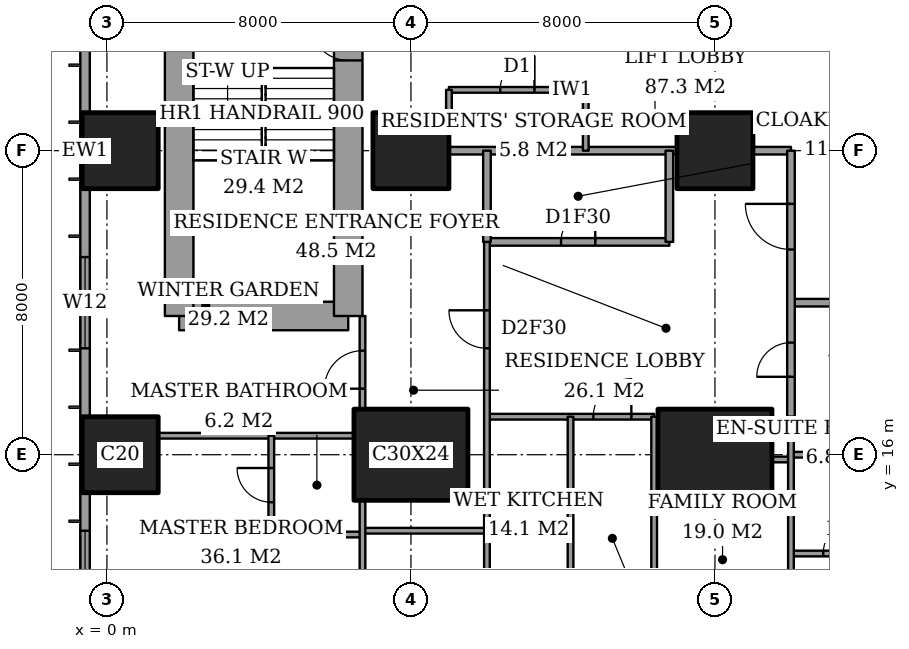
"""IFC4 building model, lengths in metres.
Left out: names, types, materials, properties, quantities, classifications, styles, units other than length and angle.
Written with IfcOpenShell. Run it as: python <this file> out.ifc"""

import sys

from ifc_helpers import new_model, si_unit, direction, frame, frame_2d, origin, origin_2d, place, context, subcontext, project, spatial, rectangle, extrude, element, fill, save


model = new_model("IFC4")
c1 = context("Model", 3, precision=1e-05, world=origin(), true_north=direction((0.0, 1.0)))
c2 = subcontext(c1, "Body", "Model", "MODEL_VIEW")
j1 = project(units=[si_unit("LENGTHUNIT", "METRE"), si_unit("PLANEANGLEUNIT", "RADIAN")], contexts=[c1])
p1 = place(None, origin())
s1 = spatial("IfcSite", under=j1, at=p1, CompositionType="ELEMENT")
p2 = place(p1, origin())
s2 = spatial("IfcBuilding", under=s1, at=p2, CompositionType="ELEMENT")
p3 = place(p2, frame((0.0, 0.0, 139.4)))
s3 = spatial("IfcBuildingStorey", under=s2, at=p3, CompositionType="ELEMENT", Elevation=139.4)
for number, where, z_axis, x_axis in (
    (1, (0.35, 16.0, 0.0), (0.0, 0.0, 1.0), (1.0, 0.0, 0.0)),
    (2, (0.35, 24.0, 0.0), (0.0, 0.0, 1.0), (1.0, 0.0, 0.0)),
):
    element("IfcColumn", number, at=place(p3, frame(where, z_axis=z_axis, x_axis=x_axis)), inside=s3, PredefinedType="COLUMN", context=c2, shape_type="SweptSolid", body=[
        extrude(rectangle(XDim=2.0, YDim=2.0, at=origin_2d()), origin(), (0.0, 0.0, 1.0), 3.6),
    ])
p4 = place(p3, frame((8.0, 16.0, 0.0), z_axis=(0.0, 0.0, 1.0), x_axis=(1.0, 0.0, 0.0)))
e3 = element("IfcColumn", 3, at=p4, inside=s3, PredefinedType="COLUMN", context=c2, shape_type="SweptSolid", body=[
    extrude(rectangle(XDim=3.0, YDim=2.4, at=origin_2d()), origin(), (0.0, 0.0, 1.0), 3.6),
])
p5 = place(p3, frame((8.0, 24.0, 0.0), z_axis=(0.0, 0.0, 1.0), x_axis=(1.0, 0.0, 0.0)))
e4 = element("IfcColumn", 4, at=p5, inside=s3, PredefinedType="COLUMN", context=c2, shape_type="SweptSolid", body=[
    extrude(rectangle(XDim=2.0, YDim=2.0, at=origin_2d()), origin(), (0.0, 0.0, 1.0), 3.6),
])
p6 = place(p3, frame((16.0, 16.0, 0.0), z_axis=(0.0, 0.0, 1.0), x_axis=(1.0, 0.0, 0.0)))
e5 = element("IfcColumn", 5, at=p6, inside=s3, PredefinedType="COLUMN", context=c2, shape_type="SweptSolid", body=[
    extrude(rectangle(XDim=3.0, YDim=2.4, at=origin_2d()), origin(), (0.0, 0.0, 1.0), 3.6),
])
p7 = place(p3, frame((16.0, 24.0, 0.0), z_axis=(0.0, 0.0, 1.0), x_axis=(1.0, 0.0, 0.0)))
e6 = element("IfcColumn", 6, at=p7, inside=s3, PredefinedType="COLUMN", context=c2, shape_type="SweptSolid", body=[
    extrude(rectangle(XDim=2.0, YDim=2.0, at=origin_2d()), origin(), (0.0, 0.0, 1.0), 3.6),
])
p8 = place(p3, frame((1.9, 19.65, 0.0), z_axis=(0.0, 0.0, 1.0), x_axis=(1.0, 0.0, 0.0)))
e7 = element("IfcWall", 7, at=p8, inside=s3, PredefinedType="SHEAR", context=c2, shape_type="SweptSolid", body=[
    extrude(rectangle(XDim=4.45, YDim=0.75, at=frame_2d((2.225, 0.0))), origin(), (0.0, 0.0, 1.0), 3.6),
])
p9 = place(p3, frame((6.35, 19.65, 0.0), z_axis=(0.0, 0.0, 1.0), x_axis=(0.0, 1.0, 0.0)))
e8 = element("IfcWall", 8, at=p9, inside=s3, PredefinedType="SHEAR", context=c2, shape_type="SweptSolid", body=[
    extrude(rectangle(XDim=8.7, YDim=0.75, at=frame_2d((4.35, 0.0))), origin(), (0.0, 0.0, 1.0), 3.6),
])
p10 = place(p9, frame((6.725, 0.0, 0.0)))
e9 = element("IfcOpeningElement", 9, at=p10, cuts=e8, PredefinedType="OPENING", context=c2, shape_type="SweptSolid", body=[
    extrude(rectangle(XDim=1.0, YDim=2.1, at=frame_2d((0.5, 1.05))), frame((0.0, 0.385, 0.0), z_axis=(0.0, -1.0, 0.0), x_axis=(1.0, 0.0, 0.0)), (0.0, 0.0, 1.0), 0.77),
])
p11 = place(p3, frame((1.9, 28.35, 0.0), z_axis=(0.0, 0.0, 1.0), x_axis=(0.0, -1.0, 0.0)))
e10 = element("IfcWall", 10, at=p11, inside=s3, PredefinedType="SHEAR", context=c2, shape_type="SweptSolid", body=[
    extrude(rectangle(XDim=8.7, YDim=0.75, at=frame_2d((4.35, 0.0))), origin(), (0.0, 0.0, 1.0), 3.6),
])
p12 = place(p3, frame((-0.575, 44.825, 0.0), z_axis=(0.0, 0.0, 1.0), x_axis=(0.0, -1.0, 0.0)))
e11 = element("IfcWall", 11, at=p12, inside=s3, PredefinedType="SOLIDWALL", context=c2, shape_type="SweptSolid", body=[
    extrude(rectangle(XDim=41.65, YDim=0.25, at=frame_2d((20.825, 0.0))), origin(), (0.0, 0.0, 1.0), 3.6),
])
p13 = place(p12, frame((0.775, 0.0, 0.4)))
e12 = element("IfcOpeningElement", 12, at=p13, cuts=e11, PredefinedType="OPENING", context=c2, shape_type="SweptSolid", body=[
    extrude(rectangle(XDim=2.4, YDim=2.2, at=frame_2d((1.2, 1.1))), frame((0.0, 0.135, 0.0), z_axis=(0.0, -1.0, 0.0), x_axis=(1.0, 0.0, 0.0)), (0.0, 0.0, 1.0), 0.27),
])
p14 = place(p12, frame((6.1, 0.0, 0.4)))
e13 = element("IfcOpeningElement", 13, at=p14, cuts=e11, PredefinedType="OPENING", context=c2, shape_type="SweptSolid", body=[
    extrude(rectangle(XDim=1.2, YDim=2.2, at=frame_2d((0.6, 1.1))), frame((0.0, 0.135, 0.0), z_axis=(0.0, -1.0, 0.0), x_axis=(1.0, 0.0, 0.0)), (0.0, 0.0, 1.0), 0.27),
])
p15 = place(p12, frame((8.425, 0.0, 0.4)))
e14 = element("IfcOpeningElement", 14, at=p15, cuts=e11, PredefinedType="OPENING", context=c2, shape_type="SweptSolid", body=[
    extrude(rectangle(XDim=2.4, YDim=2.2, at=frame_2d((1.2, 1.1))), frame((0.0, 0.135, 0.0), z_axis=(0.0, -1.0, 0.0), x_axis=(1.0, 0.0, 0.0)), (0.0, 0.0, 1.0), 0.27),
])
p16 = place(p12, frame((15.625, 0.0, 0.4)))
e15 = element("IfcOpeningElement", 15, at=p16, cuts=e11, PredefinedType="OPENING", context=c2, shape_type="SweptSolid", body=[
    extrude(rectangle(XDim=2.4, YDim=2.2, at=frame_2d((1.2, 1.1))), frame((0.0, 0.135, 0.0), z_axis=(0.0, -1.0, 0.0), x_axis=(1.0, 0.0, 0.0)), (0.0, 0.0, 1.0), 0.27),
])
p17 = place(p12, frame((23.625, 0.0, 0.4)))
e16 = element("IfcOpeningElement", 16, at=p17, cuts=e11, PredefinedType="OPENING", context=c2, shape_type="SweptSolid", body=[
    extrude(rectangle(XDim=2.4, YDim=2.2, at=frame_2d((1.2, 1.1))), frame((0.0, 0.135, 0.0), z_axis=(0.0, -1.0, 0.0), x_axis=(1.0, 0.0, 0.0)), (0.0, 0.0, 1.0), 0.27),
])
p18 = place(p12, frame((30.825, 0.0, 0.4)))
e17 = element("IfcOpeningElement", 17, at=p18, cuts=e11, PredefinedType="OPENING", context=c2, shape_type="SweptSolid", body=[
    extrude(rectangle(XDim=2.4, YDim=2.2, at=frame_2d((1.2, 1.1))), frame((0.0, 0.135, 0.0), z_axis=(0.0, -1.0, 0.0), x_axis=(1.0, 0.0, 0.0)), (0.0, 0.0, 1.0), 0.27),
])
p19 = place(p12, frame((34.5, 0.0, 0.4)))
e18 = element("IfcOpeningElement", 18, at=p19, cuts=e11, PredefinedType="OPENING", context=c2, shape_type="SweptSolid", body=[
    extrude(rectangle(XDim=1.2, YDim=2.2, at=frame_2d((0.6, 1.1))), frame((0.0, 0.135, 0.0), z_axis=(0.0, -1.0, 0.0), x_axis=(1.0, 0.0, 0.0)), (0.0, 0.0, 1.0), 0.27),
])
p20 = place(p12, frame((38.475, 0.0, 0.4)))
e19 = element("IfcOpeningElement", 19, at=p20, cuts=e11, PredefinedType="OPENING", context=c2, shape_type="SweptSolid", body=[
    extrude(rectangle(XDim=2.4, YDim=2.2, at=frame_2d((1.2, 1.1))), frame((0.0, 0.135, 0.0), z_axis=(0.0, -1.0, 0.0), x_axis=(1.0, 0.0, 0.0)), (0.0, 0.0, 1.0), 0.27),
])
p21 = place(p3, frame((18.0, 13.4, 0.0), z_axis=(0.0, 0.0, 1.0), x_axis=(1.0, 0.0, 0.0)))
e20 = element("IfcWall", 20, at=p21, inside=s3, PredefinedType="PARTITIONING", context=c2, shape_type="SweptSolid", body=[
    extrude(rectangle(XDim=2.6, YDim=0.15, at=frame_2d((1.3, 0.0))), origin(), (0.0, 0.0, 1.0), 3.35),
])
p22 = place(p21, frame((0.85, 0.0, 0.0)))
e21 = element("IfcOpeningElement", 21, at=p22, cuts=e20, PredefinedType="OPENING", context=c2, shape_type="SweptSolid", body=[
    extrude(rectangle(XDim=0.9, YDim=2.1, at=frame_2d((0.45, 1.05))), frame((0.0, 0.085, 0.0), z_axis=(0.0, -1.0, 0.0), x_axis=(1.0, 0.0, 0.0)), (0.0, 0.0, 1.0), 0.17),
])
p23 = place(p3, frame((4.325, 13.9, 0.0), z_axis=(0.0, 0.0, 1.0), x_axis=(1.0, 0.0, 0.0)))
e22 = element("IfcWall", 22, at=p23, inside=s3, PredefinedType="PARTITIONING", context=c2, shape_type="SweptSolid", body=[
    extrude(rectangle(XDim=2.4, YDim=0.15, at=frame_2d((1.2, 0.0))), origin(), (0.0, 0.0, 1.0), 3.35),
])
p24 = place(p3, frame((6.725, 14.0, 0.0), z_axis=(0.0, 0.0, 1.0), x_axis=(1.0, 0.0, 0.0)))
e23 = element("IfcWall", 23, at=p24, inside=s3, PredefinedType="PARTITIONING", context=c2, shape_type="SweptSolid", body=[
    extrude(rectangle(XDim=3.275, YDim=0.15, at=frame_2d((1.637, 0.0))), origin(), (0.0, 0.0, 1.0), 3.35),
])
p25 = place(p3, frame((17.5, 15.875, 0.0), z_axis=(0.0, 0.0, 1.0), x_axis=(1.0, 0.0, 0.0)))
e24 = element("IfcWall", 24, at=p25, inside=s3, PredefinedType="PARTITIONING", context=c2, shape_type="SweptSolid", body=[
    extrude(rectangle(XDim=0.5, YDim=0.15, at=frame_2d((0.25, 0.0))), origin(), (0.0, 0.0, 1.0), 2.634),
])
p26 = place(p3, frame((18.0, 16.0, 0.0), z_axis=(0.0, 0.0, 1.0), x_axis=(1.0, 0.0, 0.0)))
e25 = element("IfcWall", 25, at=p26, inside=s3, PredefinedType="PARTITIONING", context=c2, shape_type="SweptSolid", body=[
    extrude(rectangle(XDim=6.0, YDim=0.15, at=frame_2d((3.0, 0.0))), origin(), (0.0, 0.0, 1.0), 2.634),
])
p27 = place(p3, frame((1.35, 16.5, 0.0), z_axis=(0.0, 0.0, 1.0), x_axis=(1.0, 0.0, 0.0)))
e26 = element("IfcWall", 26, at=p27, inside=s3, PredefinedType="PARTITIONING", context=c2, shape_type="SweptSolid", body=[
    extrude(rectangle(XDim=5.15, YDim=0.15, at=frame_2d((2.575, 0.0))), origin(), (0.0, 0.0, 1.0), 3.35),
])
p28 = place(p3, frame((10.0, 17.0, 0.0), z_axis=(0.0, 0.0, 1.0), x_axis=(1.0, 0.0, 0.0)))
e27 = element("IfcWall", 27, at=p28, inside=s3, PredefinedType="PARTITIONING", context=c2, shape_type="SweptSolid", body=[
    extrude(rectangle(XDim=4.4, YDim=0.15, at=frame_2d((2.2, 0.0))), origin(), (0.0, 0.0, 1.0), 3.35),
])
p29 = place(p28, frame((2.8, 0.0, 0.0)))
e28 = element("IfcOpeningElement", 28, at=p29, cuts=e27, PredefinedType="OPENING", context=c2, shape_type="SweptSolid", body=[
    extrude(rectangle(XDim=1.0, YDim=2.1, at=frame_2d((0.5, 1.05))), frame((0.0, 0.085, 0.0), z_axis=(0.0, -1.0, 0.0), x_axis=(1.0, 0.0, 0.0)), (0.0, 0.0, 1.0), 0.17),
])
p30 = place(p3, frame((18.0, 20.0, 0.0), z_axis=(0.0, 0.0, 1.0), x_axis=(1.0, 0.0, 0.0)))
e29 = element("IfcWall", 29, at=p30, inside=s3, PredefinedType="PARTITIONING", context=c2, shape_type="SweptSolid", body=[
    extrude(rectangle(XDim=6.0, YDim=0.2, at=frame_2d((3.0, 0.0))), origin(), (0.0, 0.0, 1.0), 3.35),
])
p31 = place(p3, frame((10.0, 21.6, 0.0), z_axis=(0.0, 0.0, 1.0), x_axis=(1.0, 0.0, 0.0)))
e30 = element("IfcWall", 30, at=p31, inside=s3, PredefinedType="PARTITIONING", context=c2, shape_type="SweptSolid", body=[
    extrude(rectangle(XDim=4.8, YDim=0.2, at=frame_2d((2.4, 0.0))), origin(), (0.0, 0.0, 1.0), 3.35),
])
p32 = place(p31, frame((1.95, 0.0, 0.0)))
e31 = element("IfcOpeningElement", 31, at=p32, cuts=e30, PredefinedType="OPENING", context=c2, shape_type="SweptSolid", body=[
    extrude(rectangle(XDim=0.9, YDim=2.1, at=frame_2d((0.45, 1.05))), frame((0.0, 0.11, 0.0), z_axis=(0.0, -1.0, 0.0), x_axis=(1.0, 0.0, 0.0)), (0.0, 0.0, 1.0), 0.22),
])
p33 = place(p3, frame((9.0, 24.0, 0.0), z_axis=(0.0, 0.0, 1.0), x_axis=(1.0, 0.0, 0.0)))
e32 = element("IfcWall", 32, at=p33, inside=s3, PredefinedType="PARTITIONING", context=c2, shape_type="SweptSolid", body=[
    extrude(rectangle(XDim=6.0, YDim=0.2, at=frame_2d((3.0, 0.0))), origin(), (0.0, 0.0, 1.0), 3.35),
])
p34 = place(p3, frame((17.0, 24.0, 0.0), z_axis=(0.0, 0.0, 1.0), x_axis=(1.0, 0.0, 0.0)))
e33 = element("IfcWall", 33, at=p34, inside=s3, PredefinedType="PARTITIONING", context=c2, shape_type="SweptSolid", body=[
    extrude(rectangle(XDim=1.0, YDim=0.2, at=frame_2d((0.5, 0.0))), origin(), (0.0, 0.0, 1.0), 3.35),
])
p35 = place(p3, frame((9.0, 25.6, 0.0), z_axis=(0.0, 0.0, 1.0), x_axis=(1.0, 0.0, 0.0)))
e34 = element("IfcWall", 34, at=p35, inside=s3, PredefinedType="PARTITIONING", context=c2, shape_type="SweptSolid", body=[
    extrude(rectangle(XDim=3.6, YDim=0.15, at=frame_2d((1.8, 0.0))), origin(), (0.0, 0.0, 1.0), 3.35),
])
p36 = place(p35, frame((1.35, 0.0, 0.0)))
e35 = element("IfcOpeningElement", 35, at=p36, cuts=e34, PredefinedType="OPENING", context=c2, shape_type="SweptSolid", body=[
    extrude(rectangle(XDim=0.9, YDim=2.1, at=frame_2d((0.45, 1.05))), frame((0.0, 0.085, 0.0), z_axis=(0.0, -1.0, 0.0), x_axis=(1.0, 0.0, 0.0)), (0.0, 0.0, 1.0), 0.17),
])
p37 = place(p3, frame((4.325, 13.9, 0.0), z_axis=(0.0, 0.0, 1.0), x_axis=(0.0, 1.0, 0.0)))
e36 = element("IfcWall", 36, at=p37, inside=s3, PredefinedType="PARTITIONING", context=c2, shape_type="SweptSolid", body=[
    extrude(rectangle(XDim=2.6, YDim=0.15, at=frame_2d((1.3, 0.0))), origin(), (0.0, 0.0, 1.0), 3.35),
])
p38 = place(p37, frame((0.85, 0.0, 0.0)))
e37 = element("IfcOpeningElement", 37, at=p38, cuts=e36, PredefinedType="OPENING", context=c2, shape_type="SweptSolid", body=[
    extrude(rectangle(XDim=0.9, YDim=2.1, at=frame_2d((0.45, 1.05))), frame((0.0, 0.085, 0.0), z_axis=(0.0, -1.0, 0.0), x_axis=(1.0, 0.0, 0.0)), (0.0, 0.0, 1.0), 0.17),
])
p39 = place(p3, frame((6.725, 10.6, 0.0), z_axis=(0.0, 0.0, 1.0), x_axis=(0.0, 1.0, 0.0)))
e38 = element("IfcWall", 38, at=p39, inside=s3, PredefinedType="PARTITIONING", context=c2, shape_type="SweptSolid", body=[
    extrude(rectangle(XDim=4.2, YDim=0.15, at=frame_2d((2.1, 0.0))), origin(), (0.0, 0.0, 1.0), 3.35),
])
p40 = place(p39, frame((1.2, 0.0, 0.0)))
e39 = element("IfcOpeningElement", 39, at=p40, cuts=e38, PredefinedType="OPENING", context=c2, shape_type="SweptSolid", body=[
    extrude(rectangle(XDim=0.9, YDim=2.1, at=frame_2d((0.45, 1.05))), frame((0.0, 0.085, 0.0), z_axis=(0.0, -1.0, 0.0), x_axis=(1.0, 0.0, 0.0)), (0.0, 0.0, 1.0), 0.17),
])
p41 = place(p3, frame((6.725, 17.2, 0.0), z_axis=(0.0, 0.0, 1.0), x_axis=(0.0, 1.0, 0.0)))
e40 = element("IfcWall", 40, at=p41, inside=s3, PredefinedType="PARTITIONING", context=c2, shape_type="SweptSolid", body=[
    extrude(rectangle(XDim=2.45, YDim=0.15, at=frame_2d((1.225, 0.0))), origin(), (0.0, 0.0, 1.0), 3.35),
])
p42 = place(p41, frame((0.538, 0.0, 0.0)))
e41 = element("IfcOpeningElement", 41, at=p42, cuts=e40, PredefinedType="OPENING", context=c2, shape_type="SweptSolid", body=[
    extrude(rectangle(XDim=1.0, YDim=2.1, at=frame_2d((0.5, 1.05))), frame((0.0, 0.085, 0.0), z_axis=(0.0, -1.0, 0.0), x_axis=(1.0, 0.0, 0.0)), (0.0, 0.0, 1.0), 0.17),
])
p43 = place(p3, frame((9.0, 25.0, 0.0), z_axis=(0.0, 0.0, 1.0), x_axis=(0.0, 1.0, 0.0)))
e42 = element("IfcWall", 42, at=p43, inside=s3, PredefinedType="PARTITIONING", context=c2, shape_type="SweptSolid", body=[
    extrude(rectangle(XDim=0.6, YDim=0.15, at=frame_2d((0.3, 0.0))), origin(), (0.0, 0.0, 1.0), 3.35),
])
p44 = place(p3, frame((10.0, 21.6, 0.0), z_axis=(0.0, 0.0, 1.0), x_axis=(0.0, 1.0, 0.0)))
e43 = element("IfcWall", 43, at=p44, inside=s3, PredefinedType="PARTITIONING", context=c2, shape_type="SweptSolid", body=[
    extrude(rectangle(XDim=2.4, YDim=0.2, at=frame_2d((1.2, 0.0))), origin(), (0.0, 0.0, 1.0), 3.35),
])
p45 = place(p3, frame((10.0, 10.6, 0.0), z_axis=(0.0, 0.0, 1.0), x_axis=(0.0, 1.0, 0.0)))
e44 = element("IfcWall", 44, at=p45, inside=s3, PredefinedType="PARTITIONING", context=c2, shape_type="SweptSolid", body=[
    extrude(rectangle(XDim=11.0, YDim=0.15, at=frame_2d((5.5, 0.0))), origin(), (0.0, 0.0, 1.0), 3.35),
])
p46 = place(p45, frame((8.2, 0.0, 0.0)))
e45 = element("IfcOpeningElement", 45, at=p46, cuts=e44, PredefinedType="OPENING", context=c2, shape_type="SweptSolid", body=[
    extrude(rectangle(XDim=1.0, YDim=2.1, at=frame_2d((0.5, 1.05))), frame((0.0, 0.085, 0.0), z_axis=(0.0, -1.0, 0.0), x_axis=(1.0, 0.0, 0.0)), (0.0, 0.0, 1.0), 0.17),
])
p47 = place(p3, frame((12.2, 10.6, 0.0), z_axis=(0.0, 0.0, 1.0), x_axis=(0.0, 1.0, 0.0)))
e46 = element("IfcWall", 46, at=p47, inside=s3, PredefinedType="PARTITIONING", context=c2, shape_type="SweptSolid", body=[
    extrude(rectangle(XDim=6.4, YDim=0.15, at=frame_2d((3.2, 0.0))), origin(), (0.0, 0.0, 1.0), 3.35),
])
p48 = place(p3, frame((12.6, 24.0, 0.0), z_axis=(0.0, 0.0, 1.0), x_axis=(0.0, 1.0, 0.0)))
e47 = element("IfcWall", 47, at=p48, inside=s3, PredefinedType="PARTITIONING", context=c2, shape_type="SweptSolid", body=[
    extrude(rectangle(XDim=1.6, YDim=0.15, at=frame_2d((0.8, 0.0))), origin(), (0.0, 0.0, 1.0), 3.35),
])
p49 = place(p3, frame((14.4, 10.6, 0.0), z_axis=(0.0, 0.0, 1.0), x_axis=(0.0, 1.0, 0.0)))
e48 = element("IfcWall", 48, at=p49, inside=s3, PredefinedType="PARTITIONING", context=c2, shape_type="SweptSolid", body=[
    extrude(rectangle(XDim=6.4, YDim=0.15, at=frame_2d((3.2, 0.0))), origin(), (0.0, 0.0, 1.0), 3.35),
])
p50 = place(p3, frame((14.8, 21.6, 0.0), z_axis=(0.0, 0.0, 1.0), x_axis=(0.0, 1.0, 0.0)))
e49 = element("IfcWall", 49, at=p50, inside=s3, PredefinedType="PARTITIONING", context=c2, shape_type="SweptSolid", body=[
    extrude(rectangle(XDim=2.4, YDim=0.2, at=frame_2d((1.2, 0.0))), origin(), (0.0, 0.0, 1.0), 3.35),
])
p51 = place(p3, frame((18.0, 17.0, 0.0), z_axis=(0.0, 0.0, 1.0), x_axis=(0.0, 1.0, 0.0)))
e50 = element("IfcWall", 50, at=p51, inside=s3, PredefinedType="PARTITIONING", context=c2, shape_type="SweptSolid", body=[
    extrude(rectangle(XDim=7.0, YDim=0.2, at=frame_2d((3.5, 0.0))), origin(), (0.0, 0.0, 1.0), 3.35),
])
p52 = place(p51, frame((4.4, 0.0, 0.0)))
e51 = element("IfcOpeningElement", 51, at=p52, cuts=e50, PredefinedType="OPENING", context=c2, shape_type="SweptSolid", body=[
    extrude(rectangle(XDim=1.2, YDim=2.4, at=frame_2d((0.6, 1.2))), frame((0.0, 0.11, 0.0), z_axis=(0.0, -1.0, 0.0), x_axis=(1.0, 0.0, 0.0)), (0.0, 0.0, 1.0), 0.22),
])
p53 = place(p51, frame((1.05, 0.0, 0.0)))
e52 = element("IfcOpeningElement", 52, at=p53, cuts=e50, PredefinedType="OPENING", context=c2, shape_type="SweptSolid", body=[
    extrude(rectangle(XDim=0.9, YDim=2.1, at=frame_2d((0.45, 1.05))), frame((0.0, 0.11, 0.0), z_axis=(0.0, -1.0, 0.0), x_axis=(1.0, 0.0, 0.0)), (0.0, 0.0, 1.0), 0.22),
])
p54 = place(p3, frame((18.0, 10.6, 0.0), z_axis=(0.0, 0.0, 1.0), x_axis=(0.0, 1.0, 0.0)))
e53 = element("IfcWall", 53, at=p54, inside=s3, PredefinedType="PARTITIONING", context=c2, shape_type="SweptSolid", body=[
    extrude(rectangle(XDim=6.4, YDim=0.15, at=frame_2d((3.2, 0.0))), origin(), (0.0, 0.0, 1.0), 3.35),
])
p55 = place(p17, origin())
e54 = element("IfcWindow", 54, at=p55, inside=s3, PartitioningType="SINGLE_PANEL", PredefinedType="WINDOW", context=c2, shape_type="SweptSolid", body=[
    extrude(rectangle(XDim=2.4, YDim=2.2, at=frame_2d((1.2, 1.1))), frame((0.0, 0.03, 0.0), z_axis=(0.0, -1.0, 0.0), x_axis=(1.0, 0.0, 0.0)), (0.0, 0.0, 1.0), 0.06),
])
fill(e16, e54)
p56 = place(p18, origin())
e55 = element("IfcWindow", 55, at=p56, inside=s3, PartitioningType="SINGLE_PANEL", PredefinedType="WINDOW", context=c2, shape_type="SweptSolid", body=[
    extrude(rectangle(XDim=2.4, YDim=2.2, at=frame_2d((1.2, 1.1))), frame((0.0, 0.03, 0.0), z_axis=(0.0, -1.0, 0.0), x_axis=(1.0, 0.0, 0.0)), (0.0, 0.0, 1.0), 0.06),
])
fill(e17, e55)
p57 = place(p38, origin())
e56 = element("IfcDoor", 56, at=p57, inside=s3, OperationType="SINGLE_SWING_LEFT", PredefinedType="DOOR", context=c2, shape_type="SweptSolid", body=[
    extrude(rectangle(XDim=0.9, YDim=2.1, at=frame_2d((0.45, 1.05))), frame((0.0, 0.025, 0.0), z_axis=(0.0, -1.0, 0.0), x_axis=(1.0, 0.0, 0.0)), (0.0, 0.0, 1.0), 0.05),
])
fill(e37, e56)
p58 = place(p42, origin())
e57 = element("IfcDoor", 57, at=p58, inside=s3, OperationType="SINGLE_SWING_RIGHT", PredefinedType="DOOR", context=c2, shape_type="SweptSolid", body=[
    extrude(rectangle(XDim=1.0, YDim=2.1, at=frame_2d((0.5, 1.05))), frame((0.0, 0.025, 0.0), z_axis=(0.0, -1.0, 0.0), x_axis=(1.0, 0.0, 0.0)), (0.0, 0.0, 1.0), 0.05),
])
fill(e41, e57)
p59 = place(p46, origin())
e58 = element("IfcDoor", 58, at=p59, inside=s3, OperationType="SINGLE_SWING_LEFT", PredefinedType="DOOR", context=c2, shape_type="SweptSolid", body=[
    extrude(rectangle(XDim=1.0, YDim=2.1, at=frame_2d((0.5, 1.05))), frame((0.0, 0.025, 0.0), z_axis=(0.0, -1.0, 0.0), x_axis=(1.0, 0.0, 0.0)), (0.0, 0.0, 1.0), 0.05),
])
fill(e45, e58)
p60 = place(p32, origin())
e59 = element("IfcDoor", 59, at=p60, inside=s3, OperationType="SINGLE_SWING_LEFT", PredefinedType="DOOR", context=c2, shape_type="SweptSolid", body=[
    extrude(rectangle(XDim=0.9, YDim=2.1, at=frame_2d((0.45, 1.05))), frame((0.0, 0.025, 0.0), z_axis=(0.0, -1.0, 0.0), x_axis=(1.0, 0.0, 0.0)), (0.0, 0.0, 1.0), 0.05),
])
fill(e31, e59)
p61 = place(p52, origin())
e60 = element("IfcDoor", 60, at=p61, inside=s3, OperationType="SINGLE_SWING_LEFT", PredefinedType="DOOR", context=c2, shape_type="SweptSolid", body=[
    extrude(rectangle(XDim=1.2, YDim=2.4, at=frame_2d((0.6, 1.2))), frame((0.0, 0.025, 0.0), z_axis=(0.0, -1.0, 0.0), x_axis=(1.0, 0.0, 0.0)), (0.0, 0.0, 1.0), 0.05),
])
fill(e51, e60)
p62 = place(p29, origin())
e61 = element("IfcDoor", 61, at=p62, inside=s3, OperationType="SINGLE_SWING_LEFT", PredefinedType="DOOR", context=c2, shape_type="SweptSolid", body=[
    extrude(rectangle(XDim=1.0, YDim=2.1, at=frame_2d((0.5, 1.05))), frame((0.0, 0.025, 0.0), z_axis=(0.0, -1.0, 0.0), x_axis=(1.0, 0.0, 0.0)), (0.0, 0.0, 1.0), 0.05),
])
fill(e28, e61)
p63 = place(p22, origin())
e62 = element("IfcDoor", 62, at=p63, inside=s3, OperationType="SINGLE_SWING_LEFT", PredefinedType="DOOR", context=c2, shape_type="SweptSolid", body=[
    extrude(rectangle(XDim=0.9, YDim=2.1, at=frame_2d((0.45, 1.05))), frame((0.0, 0.025, 0.0), z_axis=(0.0, -1.0, 0.0), x_axis=(1.0, 0.0, 0.0)), (0.0, 0.0, 1.0), 0.05),
])
fill(e21, e62)
p64 = place(p53, origin())
e63 = element("IfcDoor", 63, at=p64, inside=s3, OperationType="SINGLE_SWING_RIGHT", PredefinedType="DOOR", context=c2, shape_type="SweptSolid", body=[
    extrude(rectangle(XDim=0.9, YDim=2.1, at=frame_2d((0.45, 1.05))), frame((0.0, 0.025, 0.0), z_axis=(0.0, -1.0, 0.0), x_axis=(1.0, 0.0, 0.0)), (0.0, 0.0, 1.0), 0.05),
])
fill(e52, e63)
p65 = place(p36, origin())
e64 = element("IfcDoor", 64, at=p65, inside=s3, OperationType="SINGLE_SWING_LEFT", PredefinedType="DOOR", context=c2, shape_type="SweptSolid", body=[
    extrude(rectangle(XDim=0.9, YDim=2.1, at=frame_2d((0.45, 1.05))), frame((0.0, 0.025, 0.0), z_axis=(0.0, -1.0, 0.0), x_axis=(1.0, 0.0, 0.0)), (0.0, 0.0, 1.0), 0.05),
])
fill(e35, e64)
p66 = place(p10, origin())
e65 = element("IfcDoor", 65, at=p66, inside=s3, OperationType="SINGLE_SWING_LEFT", PredefinedType="DOOR", context=c2, shape_type="SweptSolid", body=[
    extrude(rectangle(XDim=1.0, YDim=2.1, at=frame_2d((0.5, 1.05))), frame((0.0, 0.025, 0.0), z_axis=(0.0, -1.0, 0.0), x_axis=(1.0, 0.0, 0.0)), (0.0, 0.0, 1.0), 0.05),
])
fill(e9, e65)
save(model, sys.argv[1])
